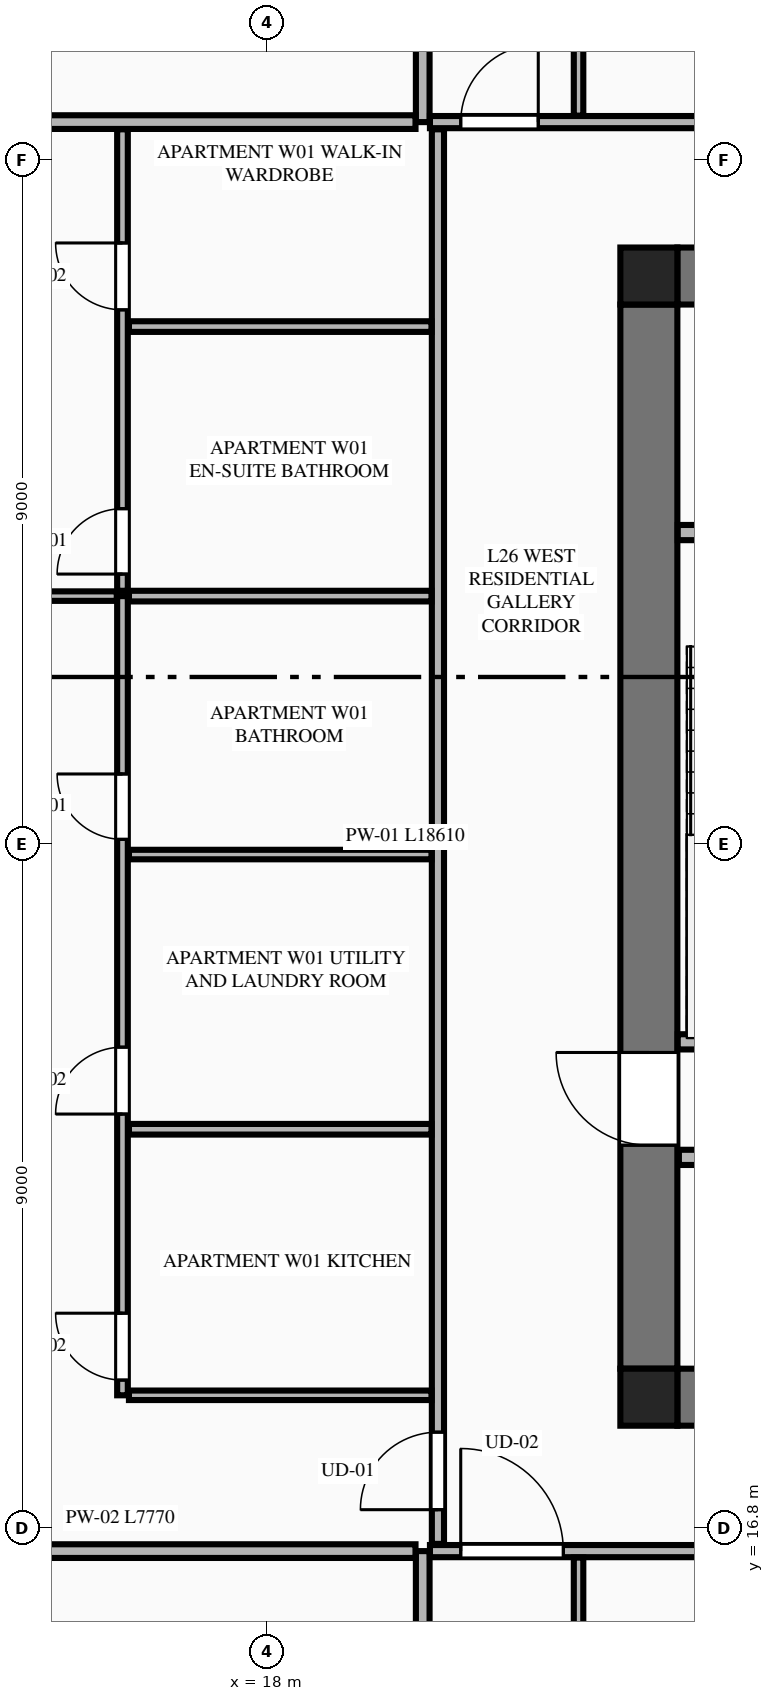
"""IFC4 building model, lengths in metres.
Left out: names, types, materials, properties, quantities, classifications, styles, units other than length and angle.
Written with IfcOpenShell. Run it as: python <this file> out.ifc"""

import sys

from ifc_helpers import new_model, si_unit, direction, frame, frame_2d, origin, origin_2d, place, context, subcontext, project, spatial, rectangle, extrude, element, fill, save


model = new_model("IFC4")
c1 = context("Model", 3, precision=1e-05, world=origin(), true_north=direction((0.0, 1.0)))
c2 = subcontext(c1, "Body", "Model", "MODEL_VIEW")
j1 = project(units=[si_unit("LENGTHUNIT", "METRE"), si_unit("PLANEANGLEUNIT", "RADIAN")], contexts=[c1])
p1 = place(None, origin())
s1 = spatial("IfcSite", under=j1, at=p1, CompositionType="ELEMENT")
p2 = place(p1, origin())
s2 = spatial("IfcBuilding", under=s1, at=p2, CompositionType="ELEMENT")
p3 = place(p2, frame((0.0, 0.0, 101.95)))
s3 = spatial("IfcBuildingStorey", under=s2, at=p3, CompositionType="ELEMENT", Elevation=101.95)
for number, where, z_axis, x_axis in (
    (1, (23.025, 18.525, 0.0), (0.0, 0.0, 1.0), (1.0, 0.0, 0.0)),
    (2, (23.025, 33.275, 0.0), (0.0, 0.0, 1.0), (1.0, 0.0, 0.0)),
):
    element("IfcColumn", number, at=place(p3, frame(where, z_axis=z_axis, x_axis=x_axis)), inside=s3, PredefinedType="COLUMN", context=c2, shape_type="SweptSolid", body=[
        extrude(rectangle(XDim=0.75, YDim=0.75, at=origin_2d()), origin(), (0.0, 0.0, 1.0), 3.55),
    ])
for number, where, z_axis, x_axis in (
    (3, (23.4, 18.525, 0.0), (0.0, 0.0, 1.0), (1.0, 0.0, 0.0)),
    (4, (23.4, 33.275, 0.0), (0.0, 0.0, 1.0), (1.0, 0.0, 0.0)),
):
    element("IfcWall", number, at=place(p3, frame(where, z_axis=z_axis, x_axis=x_axis)), inside=s3, PredefinedType="SHEAR", context=c2, shape_type="SweptSolid", body=[
        extrude(rectangle(XDim=18.0, YDim=0.75, at=frame_2d((9.0, 0.0))), origin(), (0.0, 0.0, 1.0), 3.34),
    ])
p4 = place(p3, frame((23.025, 18.9, 0.0), z_axis=(0.0, 0.0, 1.0), x_axis=(0.0, 1.0, 0.0)))
e5 = element("IfcWall", 5, at=p4, inside=s3, PredefinedType="SHEAR", context=c2, shape_type="SweptSolid", body=[
    extrude(rectangle(XDim=14.0, YDim=0.75, at=frame_2d((7.0, 0.0))), origin(), (0.0, 0.0, 1.0), 3.34),
])
p5 = place(p4, frame((2.94, 0.0, 0.0)))
e6 = element("IfcOpeningElement", 6, at=p5, cuts=e5, PredefinedType="OPENING", context=c2, shape_type="SweptSolid", body=[
    extrude(rectangle(XDim=1.22, YDim=2.25, at=frame_2d((0.61, 1.125))), frame((0.0, 0.385, 0.0), z_axis=(0.0, -1.0, 0.0), x_axis=(1.0, 0.0, 0.0)), (0.0, 0.0, 1.0), 0.77),
])
p6 = place(p3, frame((23.405, 23.2, 0.0), z_axis=(0.0, 0.0, 1.0), x_axis=(1.0, 0.0, 0.0)))
e7 = element("IfcWall", 7, at=p6, inside=s3, PredefinedType="PLUMBINGWALL", context=c2, shape_type="SweptSolid", body=[
    extrude(rectangle(XDim=3.27, YDim=0.2, at=frame_2d((1.635, 0.0))), origin(), (0.0, 0.0, 1.0), 3.34),
])
p7 = place(p3, frame((23.405, 29.9, 0.0), z_axis=(0.0, 0.0, 1.0), x_axis=(1.0, 0.0, 0.0)))
e8 = element("IfcWall", 8, at=p7, inside=s3, PredefinedType="PLUMBINGWALL", context=c2, shape_type="SweptSolid", body=[
    extrude(rectangle(XDim=3.27, YDim=0.2, at=frame_2d((1.635, 0.0))), origin(), (0.0, 0.0, 1.0), 3.34),
])
p8 = place(p7, frame((1.85, 0.0, 0.0)))
e9 = element("IfcOpeningElement", 9, at=p8, cuts=e8, PredefinedType="OPENING", context=c2, shape_type="SweptSolid", body=[
    extrude(rectangle(XDim=0.85, YDim=2.05, at=frame_2d((0.425, 1.025))), frame((0.0, 0.11, 0.0), z_axis=(0.0, -1.0, 0.0), x_axis=(1.0, 0.0, 0.0)), (0.0, 0.0, 1.0), 0.22),
])
p9 = place(p3, frame((23.42, 21.68, 0.0), z_axis=(0.0, 0.0, 1.0), x_axis=(1.0, 0.0, 0.0)))
e10 = element("IfcWall", 10, at=p9, inside=s3, PredefinedType="PLUMBINGWALL", context=c2, shape_type="SweptSolid", body=[
    extrude(rectangle(XDim=17.96, YDim=0.2, at=frame_2d((8.98, 0.0))), origin(), (0.0, 0.0, 1.0), 3.34),
])
p10 = place(p9, frame((11.6, 0.0, 0.0)))
e11 = element("IfcOpeningElement", 11, at=p10, cuts=e10, PredefinedType="OPENING", context=c2, shape_type="SweptSolid", body=[
    extrude(rectangle(XDim=1.1, YDim=2.2, at=frame_2d((0.55, 1.1))), frame((0.0, 0.11, 0.0), z_axis=(0.0, -1.0, 0.0), x_axis=(1.0, 0.0, 0.0)), (0.0, 0.0, 1.0), 0.22),
])
p11 = place(p9, frame((0.41, 0.0, 0.0)))
e12 = element("IfcOpeningElement", 12, at=p11, cuts=e10, PredefinedType="OPENING", context=c2, shape_type="SweptSolid", body=[
    extrude(rectangle(XDim=0.85, YDim=2.05, at=frame_2d((0.425, 1.025))), frame((0.0, 0.11, 0.0), z_axis=(0.0, -1.0, 0.0), x_axis=(1.0, 0.0, 0.0)), (0.0, 0.0, 1.0), 0.22),
])
p12 = place(p9, frame((6.03, 0.0, 0.0)))
e13 = element("IfcOpeningElement", 13, at=p12, cuts=e10, PredefinedType="OPENING", context=c2, shape_type="SweptSolid", body=[
    extrude(rectangle(XDim=0.85, YDim=2.05, at=frame_2d((0.425, 1.025))), frame((0.0, 0.11, 0.0), z_axis=(0.0, -1.0, 0.0), x_axis=(1.0, 0.0, 0.0)), (0.0, 0.0, 1.0), 0.22),
])
p13 = place(p9, frame((13.78, 0.0, 0.0)))
e14 = element("IfcOpeningElement", 14, at=p13, cuts=e10, PredefinedType="OPENING", context=c2, shape_type="SweptSolid", body=[
    extrude(rectangle(XDim=0.85, YDim=2.05, at=frame_2d((0.425, 1.025))), frame((0.0, 0.11, 0.0), z_axis=(0.0, -1.0, 0.0), x_axis=(1.0, 0.0, 0.0)), (0.0, 0.0, 1.0), 0.22),
])
p14 = place(p3, frame((20.05, 4.105, 0.0), z_axis=(0.0, 0.0, 1.0), x_axis=(0.0, 1.0, 0.0)))
e15 = element("IfcWall", 15, at=p14, inside=s3, PredefinedType="PARTITIONING", context=c2, shape_type="SweptSolid", body=[
    extrude(rectangle(XDim=12.395, YDim=0.18, at=frame_2d((6.198, 0.0))), origin(), (0.0, 0.0, 1.0), 3.34),
])
p15 = place(p3, frame((20.145, 16.5, 0.0), z_axis=(0.0, 0.0, 1.0), x_axis=(1.0, 0.0, 0.0)))
e16 = element("IfcWall", 16, at=p15, inside=s3, PredefinedType="PARTITIONING", context=c2, shape_type="SweptSolid", body=[
    extrude(rectangle(XDim=15.992, YDim=0.16, at=frame_2d((7.996, 0.0))), origin(), (0.0, 0.0, 1.0), 3.34),
])
p16 = place(p15, frame((0.405, 0.0, 0.0)))
e17 = element("IfcOpeningElement", 17, at=p16, cuts=e16, PredefinedType="OPENING", context=c2, shape_type="SweptSolid", body=[
    extrude(rectangle(XDim=1.35, YDim=2.35, at=frame_2d((0.675, 1.175))), frame((0.0, 0.09, 0.0), z_axis=(0.0, -1.0, 0.0), x_axis=(1.0, 0.0, 0.0)), (0.0, 0.0, 1.0), 0.18),
])
p17 = place(p3, frame((22.1, 10.036, 0.0), z_axis=(0.0, 0.0, 1.0), x_axis=(0.0, 1.0, 0.0)))
e18 = element("IfcWall", 18, at=p17, inside=s3, PredefinedType="PARTITIONING", context=c2, shape_type="SweptSolid", body=[
    extrude(rectangle(XDim=6.379, YDim=0.125, at=frame_2d((3.189, 0.0))), origin(), (0.0, 0.0, 1.0), 2.722),
])
p18 = place(p3, frame((20.05, 35.3, 0.0), z_axis=(0.0, 0.0, 1.0), x_axis=(0.0, 1.0, 0.0)))
e19 = element("IfcWall", 19, at=p18, inside=s3, PredefinedType="PARTITIONING", context=c2, shape_type="SweptSolid", body=[
    extrude(rectangle(XDim=12.195, YDim=0.18, at=frame_2d((6.098, 0.0))), origin(), (0.0, 0.0, 1.0), 3.34),
])
p19 = place(p3, frame((20.145, 35.3, 0.0), z_axis=(0.0, 0.0, 1.0), x_axis=(1.0, 0.0, 0.0)))
e20 = element("IfcWall", 20, at=p19, inside=s3, PredefinedType="PARTITIONING", context=c2, shape_type="SweptSolid", body=[
    extrude(rectangle(XDim=8.328, YDim=0.16, at=frame_2d((4.164, 0.0))), origin(), (0.0, 0.0, 1.0), 3.34),
])
p20 = place(p19, frame((0.405, 0.0, 0.0)))
e21 = element("IfcOpeningElement", 21, at=p20, cuts=e20, PredefinedType="OPENING", context=c2, shape_type="SweptSolid", body=[
    extrude(rectangle(XDim=1.02, YDim=2.25, at=frame_2d((0.51, 1.125))), frame((0.0, 0.09, 0.0), z_axis=(0.0, -1.0, 0.0), x_axis=(1.0, 0.0, 0.0)), (0.0, 0.0, 1.0), 0.18),
])
p21 = place(p3, frame((22.1, 35.385, 0.0), z_axis=(0.0, 0.0, 1.0), x_axis=(0.0, 1.0, 0.0)))
e22 = element("IfcWall", 22, at=p21, inside=s3, PredefinedType="PARTITIONING", context=c2, shape_type="SweptSolid", body=[
    extrude(rectangle(XDim=5.42, YDim=0.125, at=frame_2d((2.71, 0.0))), origin(), (0.0, 0.0, 1.0), 2.722),
])
p22 = place(p3, frame((12.185, 16.5, 0.0), z_axis=(0.0, 0.0, 1.0), x_axis=(1.0, 0.0, 0.0)))
e23 = element("IfcWall", 23, at=p22, inside=s3, PredefinedType="PARTITIONING", context=c2, shape_type="SweptSolid", body=[
    extrude(rectangle(XDim=7.77, YDim=0.18, at=frame_2d((3.885, 0.0))), origin(), (0.0, 0.0, 1.0), 3.34),
])
p23 = place(p3, frame((12.286, 35.3, 0.0), z_axis=(0.0, 0.0, 1.0), x_axis=(1.0, 0.0, 0.0)))
e24 = element("IfcWall", 24, at=p23, inside=s3, PredefinedType="PARTITIONING", context=c2, shape_type="SweptSolid", body=[
    extrude(rectangle(XDim=7.669, YDim=0.18, at=frame_2d((3.834, 0.0))), origin(), (0.0, 0.0, 1.0), 3.34),
])
p24 = place(p3, frame((20.25, 16.595, 0.0), z_axis=(0.0, 0.0, 1.0), x_axis=(0.0, 1.0, 0.0)))
e25 = element("IfcWall", 25, at=p24, inside=s3, PredefinedType="PARTITIONING", context=c2, shape_type="SweptSolid", body=[
    extrude(rectangle(XDim=18.61, YDim=0.16, at=frame_2d((9.305, 0.0))), origin(), (0.0, 0.0, 1.0), 3.34),
])
p25 = place(p24, frame((0.45, 0.0, 0.0)))
e26 = element("IfcOpeningElement", 26, at=p25, cuts=e25, PredefinedType="OPENING", context=c2, shape_type="SweptSolid", body=[
    extrude(rectangle(XDim=1.02, YDim=2.25, at=frame_2d((0.51, 1.125))), frame((0.0, 0.09, 0.0), z_axis=(0.0, -1.0, 0.0), x_axis=(1.0, 0.0, 0.0)), (0.0, 0.0, 1.0), 0.18),
])
p26 = place(p3, frame((16.185, 18.55, 0.0), z_axis=(0.0, 0.0, 1.0), x_axis=(1.0, 0.0, 0.0)))
e27 = element("IfcWall", 27, at=p26, inside=s3, PredefinedType="PARTITIONING", context=c2, shape_type="SweptSolid", body=[
    extrude(rectangle(XDim=3.98, YDim=0.125, at=frame_2d((1.99, 0.0))), origin(), (0.0, 0.0, 1.0), 2.722),
])
p27 = place(p3, frame((16.1, 18.55, 0.0), z_axis=(0.0, 0.0, 1.0), x_axis=(0.0, 1.0, 0.0)))
e28 = element("IfcWall", 28, at=p27, inside=s3, PredefinedType="PLUMBINGWALL", context=c2, shape_type="SweptSolid", body=[
    extrude(rectangle(XDim=10.514, YDim=0.14, at=frame_2d((5.257, 0.0))), origin(), (0.0, 0.0, 1.0), 3.34),
])
p28 = place(p27, frame((0.2, 0.0, 0.0)))
e29 = element("IfcOpeningElement", 29, at=p28, cuts=e28, PredefinedType="OPENING", context=c2, shape_type="SweptSolid", body=[
    extrude(rectangle(XDim=0.88, YDim=2.15, at=frame_2d((0.44, 1.075))), frame((0.0, 0.08, 0.0), z_axis=(0.0, -1.0, 0.0), x_axis=(1.0, 0.0, 0.0)), (0.0, 0.0, 1.0), 0.16),
])
p29 = place(p27, frame((3.7, 0.0, 0.0)))
e30 = element("IfcOpeningElement", 30, at=p29, cuts=e28, PredefinedType="OPENING", context=c2, shape_type="SweptSolid", body=[
    extrude(rectangle(XDim=0.88, YDim=2.15, at=frame_2d((0.44, 1.075))), frame((0.0, 0.08, 0.0), z_axis=(0.0, -1.0, 0.0), x_axis=(1.0, 0.0, 0.0)), (0.0, 0.0, 1.0), 0.16),
])
p30 = place(p27, frame((7.314, 0.0, 0.0)))
e31 = element("IfcOpeningElement", 31, at=p30, cuts=e28, PredefinedType="OPENING", context=c2, shape_type="SweptSolid", body=[
    extrude(rectangle(XDim=0.86, YDim=2.1, at=frame_2d((0.43, 1.05))), frame((0.0, 0.08, 0.0), z_axis=(0.0, -1.0, 0.0), x_axis=(1.0, 0.0, 0.0)), (0.0, 0.0, 1.0), 0.16),
])
p31 = place(p3, frame((16.1, 29.134, 0.0), z_axis=(0.0, 0.0, 1.0), x_axis=(0.0, 1.0, 0.0)))
e32 = element("IfcWall", 32, at=p31, inside=s3, PredefinedType="PLUMBINGWALL", context=c2, shape_type="SweptSolid", body=[
    extrude(rectangle(XDim=6.071, YDim=0.14, at=frame_2d((3.036, 0.0))), origin(), (0.0, 0.0, 1.0), 3.34),
])
p32 = place(p31, frame((0.22, 0.0, 0.0)))
e33 = element("IfcOpeningElement", 33, at=p32, cuts=e32, PredefinedType="OPENING", context=c2, shape_type="SweptSolid", body=[
    extrude(rectangle(XDim=0.86, YDim=2.1, at=frame_2d((0.43, 1.05))), frame((0.0, 0.08, 0.0), z_axis=(0.0, -1.0, 0.0), x_axis=(1.0, 0.0, 0.0)), (0.0, 0.0, 1.0), 0.16),
])
p33 = place(p31, frame((3.696, 0.0, 0.0)))
e34 = element("IfcOpeningElement", 34, at=p33, cuts=e32, PredefinedType="OPENING", context=c2, shape_type="SweptSolid", body=[
    extrude(rectangle(XDim=0.88, YDim=2.15, at=frame_2d((0.44, 1.075))), frame((0.0, 0.08, 0.0), z_axis=(0.0, -1.0, 0.0), x_axis=(1.0, 0.0, 0.0)), (0.0, 0.0, 1.0), 0.16),
])
p34 = place(p3, frame((16.185, 29.064, 0.0), z_axis=(0.0, 0.0, 1.0), x_axis=(1.0, 0.0, 0.0)))
e35 = element("IfcWall", 35, at=p34, inside=s3, PredefinedType="PLUMBINGWALL", context=c2, shape_type="SweptSolid", body=[
    extrude(rectangle(XDim=3.98, YDim=0.14, at=frame_2d((1.99, 0.0))), origin(), (0.0, 0.0, 1.0), 3.34),
])
p35 = place(p3, frame((9.116, 29.064, 0.0), z_axis=(0.0, 0.0, 1.0), x_axis=(1.0, 0.0, 0.0)))
e36 = element("IfcWall", 36, at=p35, inside=s3, PredefinedType="PARTITIONING", context=c2, shape_type="SweptSolid", body=[
    extrude(rectangle(XDim=6.909, YDim=0.125, at=frame_2d((3.455, 0.0))), origin(), (0.0, 0.0, 1.0), 3.34),
])
p36 = place(p35, frame((0.35, 0.0, 0.0)))
e37 = element("IfcOpeningElement", 37, at=p36, cuts=e36, PredefinedType="OPENING", context=c2, shape_type="SweptSolid", body=[
    extrude(rectangle(XDim=0.92, YDim=2.15, at=frame_2d((0.46, 1.075))), frame((0.0, 0.073, 0.0), z_axis=(0.0, -1.0, 0.0), x_axis=(1.0, 0.0, 0.0)), (0.0, 0.0, 1.0), 0.145),
])
p37 = place(p3, frame((16.185, 22.05, 0.0), z_axis=(0.0, 0.0, 1.0), x_axis=(1.0, 0.0, 0.0)))
e38 = element("IfcWall", 38, at=p37, inside=s3, PredefinedType="PLUMBINGWALL", context=c2, shape_type="SweptSolid", body=[
    extrude(rectangle(XDim=3.98, YDim=0.14, at=frame_2d((1.99, 0.0))), origin(), (0.0, 0.0, 1.0), 3.34),
])
p38 = place(p3, frame((16.185, 25.664, 0.0), z_axis=(0.0, 0.0, 1.0), x_axis=(1.0, 0.0, 0.0)))
e39 = element("IfcWall", 39, at=p38, inside=s3, PredefinedType="PARTITIONING", context=c2, shape_type="SweptSolid", body=[
    extrude(rectangle(XDim=3.98, YDim=0.125, at=frame_2d((1.99, 0.0))), origin(), (0.0, 0.0, 1.0), 3.34),
])
p39 = place(p3, frame((16.185, 32.61, 0.0), z_axis=(0.0, 0.0, 1.0), x_axis=(1.0, 0.0, 0.0)))
e40 = element("IfcWall", 40, at=p39, inside=s3, PredefinedType="PLUMBINGWALL", context=c2, shape_type="SweptSolid", body=[
    extrude(rectangle(XDim=3.98, YDim=0.14, at=frame_2d((1.99, 0.0))), origin(), (0.0, 0.0, 1.0), 3.34),
])
p40 = place(p5, origin())
e41 = element("IfcDoor", 41, at=p40, inside=s3, OperationType="SINGLE_SWING_RIGHT", PredefinedType="DOOR", context=c2, shape_type="SweptSolid", body=[
    extrude(rectangle(XDim=1.22, YDim=2.25, at=frame_2d((0.61, 1.125))), frame((0.0, 0.025, 0.0), z_axis=(0.0, -1.0, 0.0), x_axis=(1.0, 0.0, 0.0)), (0.0, 0.0, 1.0), 0.05),
])
fill(e6, e41)
p41 = place(p16, origin())
e42 = element("IfcDoor", 42, at=p41, inside=s3, OperationType="SINGLE_SWING_LEFT", PredefinedType="DOOR", context=c2, shape_type="SweptSolid", body=[
    extrude(rectangle(XDim=1.35, YDim=2.35, at=frame_2d((0.675, 1.175))), frame((0.0, 0.025, 0.0), z_axis=(0.0, -1.0, 0.0), x_axis=(1.0, 0.0, 0.0)), (0.0, 0.0, 1.0), 0.05),
])
fill(e17, e42)
p42 = place(p20, origin())
e43 = element("IfcDoor", 43, at=p42, inside=s3, OperationType="SINGLE_SWING_RIGHT", PredefinedType="DOOR", context=c2, shape_type="SweptSolid", body=[
    extrude(rectangle(XDim=1.02, YDim=2.25, at=frame_2d((0.51, 1.125))), frame((0.0, 0.025, 0.0), z_axis=(0.0, -1.0, 0.0), x_axis=(1.0, 0.0, 0.0)), (0.0, 0.0, 1.0), 0.05),
])
fill(e21, e43)
p43 = place(p28, origin())
e44 = element("IfcDoor", 44, at=p43, inside=s3, OperationType="SINGLE_SWING_RIGHT", PredefinedType="DOOR", context=c2, shape_type="SweptSolid", body=[
    extrude(rectangle(XDim=0.88, YDim=2.15, at=frame_2d((0.44, 1.075))), frame((0.0, 0.025, 0.0), z_axis=(0.0, -1.0, 0.0), x_axis=(1.0, 0.0, 0.0)), (0.0, 0.0, 1.0), 0.05),
])
fill(e29, e44)
p44 = place(p29, origin())
e45 = element("IfcDoor", 45, at=p44, inside=s3, OperationType="SINGLE_SWING_LEFT", PredefinedType="DOOR", context=c2, shape_type="SweptSolid", body=[
    extrude(rectangle(XDim=0.88, YDim=2.15, at=frame_2d((0.44, 1.075))), frame((0.0, 0.025, 0.0), z_axis=(0.0, -1.0, 0.0), x_axis=(1.0, 0.0, 0.0)), (0.0, 0.0, 1.0), 0.05),
])
fill(e30, e45)
p45 = place(p30, origin())
e46 = element("IfcDoor", 46, at=p45, inside=s3, OperationType="SINGLE_SWING_RIGHT", PredefinedType="DOOR", context=c2, shape_type="SweptSolid", body=[
    extrude(rectangle(XDim=0.86, YDim=2.1, at=frame_2d((0.43, 1.05))), frame((0.0, 0.025, 0.0), z_axis=(0.0, -1.0, 0.0), x_axis=(1.0, 0.0, 0.0)), (0.0, 0.0, 1.0), 0.05),
])
fill(e31, e46)
p46 = place(p32, origin())
e47 = element("IfcDoor", 47, at=p46, inside=s3, OperationType="SINGLE_SWING_LEFT", PredefinedType="DOOR", context=c2, shape_type="SweptSolid", body=[
    extrude(rectangle(XDim=0.86, YDim=2.1, at=frame_2d((0.43, 1.05))), frame((0.0, 0.025, 0.0), z_axis=(0.0, -1.0, 0.0), x_axis=(1.0, 0.0, 0.0)), (0.0, 0.0, 1.0), 0.05),
])
fill(e33, e47)
p47 = place(p33, origin())
e48 = element("IfcDoor", 48, at=p47, inside=s3, OperationType="SINGLE_SWING_RIGHT", PredefinedType="DOOR", context=c2, shape_type="SweptSolid", body=[
    extrude(rectangle(XDim=0.88, YDim=2.15, at=frame_2d((0.44, 1.075))), frame((0.0, 0.025, 0.0), z_axis=(0.0, -1.0, 0.0), x_axis=(1.0, 0.0, 0.0)), (0.0, 0.0, 1.0), 0.05),
])
fill(e34, e48)
p48 = place(p25, origin())
e49 = element("IfcDoor", 49, at=p48, inside=s3, OperationType="SINGLE_SWING_LEFT", PredefinedType="DOOR", context=c2, shape_type="SweptSolid", body=[
    extrude(rectangle(XDim=1.02, YDim=2.25, at=frame_2d((0.51, 1.125))), frame((0.0, 0.025, 0.0), z_axis=(0.0, -1.0, 0.0), x_axis=(1.0, 0.0, 0.0)), (0.0, 0.0, 1.0), 0.05),
])
fill(e26, e49)
save(model, sys.argv[1])
